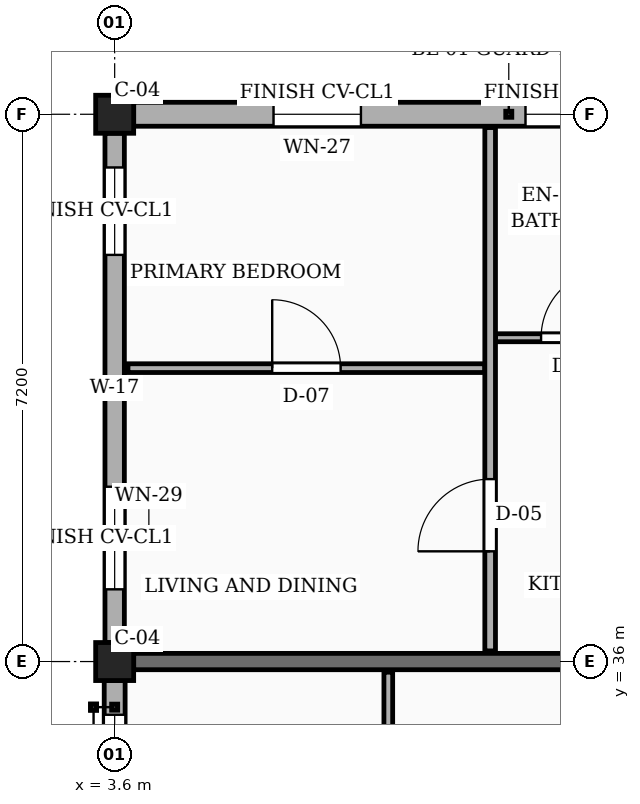
"""IFC4 building model, lengths in metres.
Left out: names, types, materials, properties, quantities, classifications, styles, units other than length and angle.
Written with IfcOpenShell. Run it as: python <this file> out.ifc"""

import sys

from ifc_helpers import new_model, si_unit, direction, frame, frame_2d, origin, origin_2d, place, context, subcontext, project, spatial, rectangle, extrude, element, fill, save


model = new_model("IFC4")
c1 = context("Model", 3, precision=1e-05, world=origin(), true_north=direction((0.0, 1.0)))
c2 = subcontext(c1, "Body", "Model", "MODEL_VIEW")
j1 = project(units=[si_unit("LENGTHUNIT", "METRE"), si_unit("PLANEANGLEUNIT", "RADIAN")], contexts=[c1])
p1 = place(None, origin())
s1 = spatial("IfcSite", under=j1, at=p1, CompositionType="ELEMENT")
p2 = place(p1, origin())
s2 = spatial("IfcBuilding", under=s1, at=p2, CompositionType="ELEMENT")
p3 = place(p2, frame((0.0, 0.0, 26.55)))
s3 = spatial("IfcBuildingStorey", under=s2, at=p3, CompositionType="ELEMENT", Elevation=26.55)
for number, where, z_axis, x_axis in (
    (1, (3.6, 36.0, 0.0), (0.0, 0.0, 1.0), (1.0, 0.0, 0.0)),
    (2, (3.6, 43.2, 0.0), (0.0, 0.0, 1.0), (1.0, 0.0, 0.0)),
):
    element("IfcColumn", number, at=place(p3, frame(where, z_axis=z_axis, x_axis=x_axis)), inside=s3, PredefinedType="COLUMN", context=c2, shape_type="SweptSolid", body=[
        extrude(rectangle(XDim=0.5, YDim=0.5, at=origin_2d()), origin(), (0.0, 0.0, 1.0), 3.15),
    ])
p4 = place(p3, frame((3.85, 36.0, 0.0), z_axis=(0.0, 0.0, 1.0), x_axis=(1.0, 0.0, 0.0)))
e3 = element("IfcWall", 3, at=p4, inside=s3, PredefinedType="SOLIDWALL", context=c2, shape_type="SweptSolid", body=[
    extrude(rectangle(XDim=6.75, YDim=0.215, at=frame_2d((3.375, 0.0))), origin(), (0.0, 0.0, 1.0), 2.17),
])
p5 = place(p3, frame((10.55, 43.2, 0.0), z_axis=(0.0, 0.0, 1.0), x_axis=(-1.0, 0.0, 0.0)))
e4 = element("IfcWall", 4, at=p5, inside=s3, PredefinedType="SOLIDWALL", context=c2, shape_type="SweptSolid", body=[
    extrude(rectangle(XDim=6.7, YDim=0.315, at=frame_2d((3.35, 0.0))), origin(), (0.0, 0.0, 1.0), 2.44),
])
p6 = place(p5, frame((0.605, 0.0, 0.78)))
e5 = element("IfcOpeningElement", 5, at=p6, cuts=e4, PredefinedType="OPENING", context=c2, shape_type="SweptSolid", body=[
    extrude(rectangle(XDim=0.94, YDim=1.44, at=frame_2d((0.47, 0.72))), frame((0.0, 0.167, 0.0), z_axis=(0.0, -1.0, 0.0), x_axis=(1.0, 0.0, 0.0)), (0.0, 0.0, 1.0), 0.335),
])
p7 = place(p5, frame((3.71, 0.0, 0.78)))
e6 = element("IfcOpeningElement", 6, at=p7, cuts=e4, PredefinedType="OPENING", context=c2, shape_type="SweptSolid", body=[
    extrude(rectangle(XDim=1.15, YDim=1.44, at=frame_2d((0.575, 0.72))), frame((0.0, 0.167, 0.0), z_axis=(0.0, -1.0, 0.0), x_axis=(1.0, 0.0, 0.0)), (0.0, 0.0, 1.0), 0.335),
])
p8 = place(p3, frame((3.6, 42.95, 0.0), z_axis=(0.0, 0.0, 1.0), x_axis=(0.0, -1.0, 0.0)))
e7 = element("IfcWall", 7, at=p8, inside=s3, PredefinedType="SOLIDWALL", context=c2, shape_type="SweptSolid", body=[
    extrude(rectangle(XDim=6.7, YDim=0.255, at=frame_2d((3.35, 0.0))), origin(), (0.0, 0.0, 1.0), 2.44),
])
p9 = place(p8, frame((0.45, 0.0, 0.78)))
e8 = element("IfcOpeningElement", 8, at=p9, cuts=e7, PredefinedType="OPENING", context=c2, shape_type="SweptSolid", body=[
    extrude(rectangle(XDim=1.15, YDim=1.44, at=frame_2d((0.575, 0.72))), frame((0.0, 0.137, 0.0), z_axis=(0.0, -1.0, 0.0), x_axis=(1.0, 0.0, 0.0)), (0.0, 0.0, 1.0), 0.275),
])
p10 = place(p8, frame((4.65, 0.0, 0.78)))
e9 = element("IfcOpeningElement", 9, at=p10, cuts=e7, PredefinedType="OPENING", context=c2, shape_type="SweptSolid", body=[
    extrude(rectangle(XDim=1.35, YDim=1.44, at=frame_2d((0.675, 0.72))), frame((0.0, 0.137, 0.0), z_axis=(0.0, -1.0, 0.0), x_axis=(1.0, 0.0, 0.0)), (0.0, 0.0, 1.0), 0.275),
])
p11 = place(p3, frame((3.6, 35.75, 0.0), z_axis=(0.0, 0.0, 1.0), x_axis=(0.0, -1.0, 0.0)))
e10 = element("IfcWall", 10, at=p11, inside=s3, PredefinedType="SOLIDWALL", context=c2, shape_type="SweptSolid", body=[
    extrude(rectangle(XDim=6.7, YDim=0.275, at=frame_2d((3.35, 0.0))), origin(), (0.0, 0.0, 1.0), 2.44),
])
p12 = place(p11, frame((0.45, 0.0, 0.78)))
e11 = element("IfcOpeningElement", 11, at=p12, cuts=e10, PredefinedType="OPENING", context=c2, shape_type="SweptSolid", body=[
    extrude(rectangle(XDim=1.35, YDim=1.44, at=frame_2d((0.675, 0.72))), frame((0.0, 0.147, 0.0), z_axis=(0.0, -1.0, 0.0), x_axis=(1.0, 0.0, 0.0)), (0.0, 0.0, 1.0), 0.295),
])
p13 = place(p11, frame((4.65, 0.0, 0.78)))
e12 = element("IfcOpeningElement", 12, at=p13, cuts=e10, PredefinedType="OPENING", context=c2, shape_type="SweptSolid", body=[
    extrude(rectangle(XDim=0.85, YDim=1.15, at=frame_2d((0.425, 0.575))), frame((0.0, 0.147, 0.0), z_axis=(0.0, -1.0, 0.0), x_axis=(1.0, 0.0, 0.0)), (0.0, 0.0, 1.0), 0.295),
])
p14 = place(p3, frame((7.2, 28.94, 0.0), z_axis=(0.0, 0.0, 1.0), x_axis=(0.0, 1.0, 0.0)))
e13 = element("IfcWall", 13, at=p14, inside=s3, PredefinedType="PARTITIONING", context=c2, shape_type="SweptSolid", body=[
    extrude(rectangle(XDim=6.92, YDim=0.115, at=frame_2d((3.46, 0.0))), origin(), (0.0, 0.0, 1.0), 2.305),
])
p15 = place(p14, frame((1.05, 0.0, 0.0)))
e14 = element("IfcOpeningElement", 14, at=p15, cuts=e13, PredefinedType="OPENING", context=c2, shape_type="SweptSolid", body=[
    extrude(rectangle(XDim=0.87, YDim=2.05, at=frame_2d((0.435, 1.025))), frame((0.0, 0.067, 0.0), z_axis=(0.0, -1.0, 0.0), x_axis=(1.0, 0.0, 0.0)), (0.0, 0.0, 1.0), 0.135),
])
p16 = place(p14, frame((4.45, 0.0, 0.0)))
e15 = element("IfcOpeningElement", 15, at=p16, cuts=e13, PredefinedType="OPENING", context=c2, shape_type="SweptSolid", body=[
    extrude(rectangle(XDim=0.88, YDim=2.08, at=frame_2d((0.44, 1.04))), frame((0.0, 0.067, 0.0), z_axis=(0.0, -1.0, 0.0), x_axis=(1.0, 0.0, 0.0)), (0.0, 0.0, 1.0), 0.135),
])
p17 = place(p3, frame((3.775, 39.86, 0.0), z_axis=(0.0, 0.0, 1.0), x_axis=(1.0, 0.0, 0.0)))
e16 = element("IfcWall", 16, at=p17, inside=s3, PredefinedType="PARTITIONING", context=c2, shape_type="SweptSolid", body=[
    extrude(rectangle(XDim=4.695, YDim=0.115, at=frame_2d((2.348, 0.0))), origin(), (0.0, 0.0, 1.0), 2.305),
])
p18 = place(p17, frame((1.897, 0.0, 0.0)))
e17 = element("IfcOpeningElement", 17, at=p18, cuts=e16, PredefinedType="OPENING", context=c2, shape_type="SweptSolid", body=[
    extrude(rectangle(XDim=0.9, YDim=2.1, at=frame_2d((0.45, 1.05))), frame((0.0, 0.067, 0.0), z_axis=(0.0, -1.0, 0.0), x_axis=(1.0, 0.0, 0.0)), (0.0, 0.0, 1.0), 0.135),
])
p19 = place(p3, frame((8.61, 40.26, 0.0), z_axis=(0.0, 0.0, 1.0), x_axis=(1.0, 0.0, 0.0)))
e18 = element("IfcWall", 18, at=p19, inside=s3, PredefinedType="PARTITIONING", context=c2, shape_type="SweptSolid", body=[
    extrude(rectangle(XDim=2.1, YDim=0.105, at=frame_2d((1.05, 0.0))), origin(), (0.0, 0.0, 1.0), 2.305),
])
p20 = place(p19, frame((0.6, 0.0, 0.0)))
e19 = element("IfcOpeningElement", 19, at=p20, cuts=e18, PredefinedType="OPENING", context=c2, shape_type="SweptSolid", body=[
    extrude(rectangle(XDim=0.9, YDim=2.05, at=frame_2d((0.45, 1.025))), frame((0.0, 0.062, 0.0), z_axis=(0.0, -1.0, 0.0), x_axis=(1.0, 0.0, 0.0)), (0.0, 0.0, 1.0), 0.125),
])
p21 = place(p3, frame((8.54, 36.14, 0.0), z_axis=(0.0, 0.0, 1.0), x_axis=(0.0, 1.0, 0.0)))
e20 = element("IfcWall", 20, at=p21, inside=s3, PredefinedType="PARTITIONING", context=c2, shape_type="SweptSolid", body=[
    extrude(rectangle(XDim=6.885, YDim=0.14, at=frame_2d((3.442, 0.0))), origin(), (0.0, 0.0, 1.0), 2.305),
])
p22 = place(p21, frame((1.31, 0.0, 0.0)))
e21 = element("IfcOpeningElement", 21, at=p22, cuts=e20, PredefinedType="OPENING", context=c2, shape_type="SweptSolid", body=[
    extrude(rectangle(XDim=0.95, YDim=2.1, at=frame_2d((0.475, 1.05))), frame((0.0, 0.08, 0.0), z_axis=(0.0, -1.0, 0.0), x_axis=(1.0, 0.0, 0.0)), (0.0, 0.0, 1.0), 0.16),
])
p23 = place(p6, origin())
e22 = element("IfcWindow", 22, at=p23, inside=s3, PartitioningType="SINGLE_PANEL", PredefinedType="WINDOW", context=c2, shape_type="SweptSolid", body=[
    extrude(rectangle(XDim=0.94, YDim=1.44, at=frame_2d((0.47, 0.72))), frame((0.0, 0.03, 0.0), z_axis=(0.0, -1.0, 0.0), x_axis=(1.0, 0.0, 0.0)), (0.0, 0.0, 1.0), 0.06),
])
fill(e5, e22)
p24 = place(p7, origin())
e23 = element("IfcWindow", 23, at=p24, inside=s3, PartitioningType="SINGLE_PANEL", PredefinedType="WINDOW", context=c2, shape_type="SweptSolid", body=[
    extrude(rectangle(XDim=1.15, YDim=1.44, at=frame_2d((0.575, 0.72))), frame((0.0, 0.03, 0.0), z_axis=(0.0, -1.0, 0.0), x_axis=(1.0, 0.0, 0.0)), (0.0, 0.0, 1.0), 0.06),
])
fill(e6, e23)
p25 = place(p9, origin())
e24 = element("IfcWindow", 24, at=p25, inside=s3, PartitioningType="SINGLE_PANEL", PredefinedType="WINDOW", context=c2, shape_type="SweptSolid", body=[
    extrude(rectangle(XDim=1.15, YDim=1.44, at=frame_2d((0.575, 0.72))), frame((0.0, 0.03, 0.0), z_axis=(0.0, -1.0, 0.0), x_axis=(1.0, 0.0, 0.0)), (0.0, 0.0, 1.0), 0.06),
])
fill(e8, e24)
p26 = place(p10, origin())
e25 = element("IfcWindow", 25, at=p26, inside=s3, PartitioningType="SINGLE_PANEL", PredefinedType="WINDOW", context=c2, shape_type="SweptSolid", body=[
    extrude(rectangle(XDim=1.35, YDim=1.44, at=frame_2d((0.675, 0.72))), frame((0.0, 0.03, 0.0), z_axis=(0.0, -1.0, 0.0), x_axis=(1.0, 0.0, 0.0)), (0.0, 0.0, 1.0), 0.06),
])
fill(e9, e25)
p27 = place(p12, origin())
e26 = element("IfcWindow", 26, at=p27, inside=s3, PartitioningType="SINGLE_PANEL", PredefinedType="WINDOW", context=c2, shape_type="SweptSolid", body=[
    extrude(rectangle(XDim=1.35, YDim=1.44, at=frame_2d((0.675, 0.72))), frame((0.0, 0.03, 0.0), z_axis=(0.0, -1.0, 0.0), x_axis=(1.0, 0.0, 0.0)), (0.0, 0.0, 1.0), 0.06),
])
fill(e11, e26)
p28 = place(p18, origin())
e27 = element("IfcDoor", 27, at=p28, inside=s3, OperationType="SINGLE_SWING_LEFT", PredefinedType="DOOR", context=c2, shape_type="SweptSolid", body=[
    extrude(rectangle(XDim=0.9, YDim=2.1, at=frame_2d((0.45, 1.05))), frame((0.0, 0.025, 0.0), z_axis=(0.0, -1.0, 0.0), x_axis=(1.0, 0.0, 0.0)), (0.0, 0.0, 1.0), 0.05),
])
fill(e17, e27)
p29 = place(p20, origin())
e28 = element("IfcDoor", 28, at=p29, inside=s3, OperationType="SINGLE_SWING_RIGHT", PredefinedType="DOOR", context=c2, shape_type="SweptSolid", body=[
    extrude(rectangle(XDim=0.9, YDim=2.05, at=frame_2d((0.45, 1.025))), frame((0.0, 0.025, 0.0), z_axis=(0.0, -1.0, 0.0), x_axis=(1.0, 0.0, 0.0)), (0.0, 0.0, 1.0), 0.05),
])
fill(e19, e28)
p30 = place(p22, origin())
e29 = element("IfcDoor", 29, at=p30, inside=s3, OperationType="SINGLE_SWING_LEFT", PredefinedType="DOOR", context=c2, shape_type="SweptSolid", body=[
    extrude(rectangle(XDim=0.95, YDim=2.1, at=frame_2d((0.475, 1.05))), frame((0.0, 0.025, 0.0), z_axis=(0.0, -1.0, 0.0), x_axis=(1.0, 0.0, 0.0)), (0.0, 0.0, 1.0), 0.05),
])
fill(e21, e29)
save(model, sys.argv[1])
